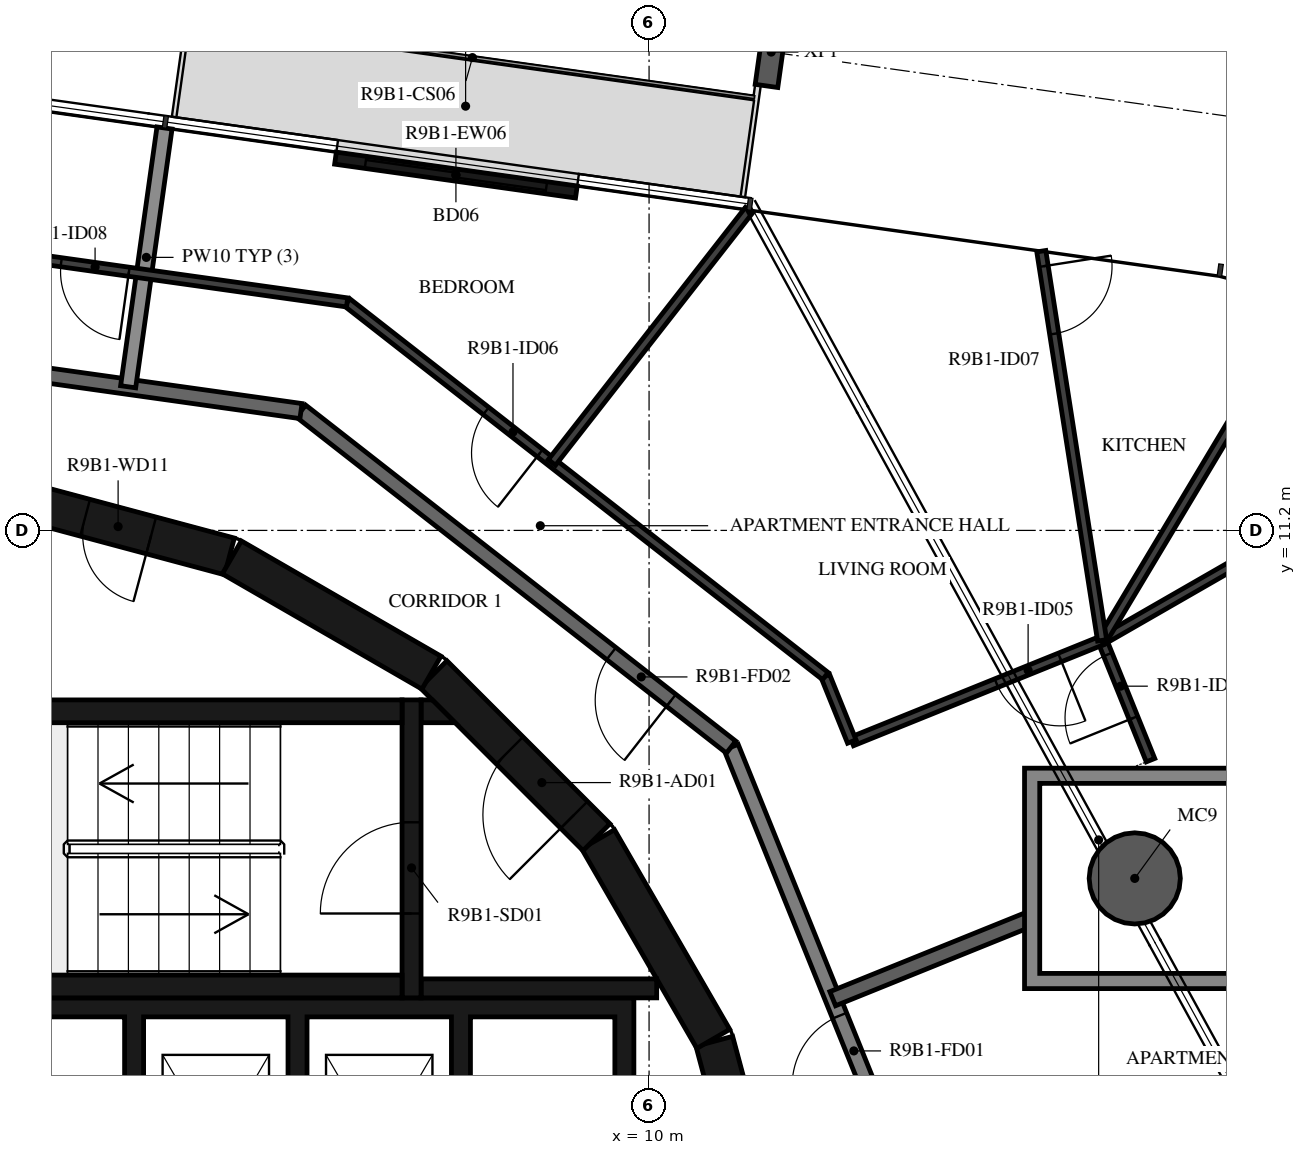
"""IFC4 building model, lengths in metres.
Left out: names, types, materials, properties, quantities, classifications, styles, units other than length and angle.
Written with IfcOpenShell. Run it as: python <this file> out.ifc"""

import sys

from ifc_helpers import new_model, si_unit, direction, frame, frame_2d, origin, origin_2d, place, context, subcontext, project, spatial, polyline, rectangle, hollow_circle, i_section, outline, extrude, element, fill, save


model = new_model("IFC4")
c1 = context("Model", 3, precision=1e-05, world=origin(), true_north=direction((0.0, 1.0)))
c2 = subcontext(c1, "Body", "Model", "MODEL_VIEW")
j1 = project(units=[si_unit("LENGTHUNIT", "METRE"), si_unit("PLANEANGLEUNIT", "RADIAN")], contexts=[c1])
p1 = place(None, origin())
s1 = spatial("IfcSite", under=j1, at=p1, CompositionType="ELEMENT")
p2 = place(p1, origin())
s2 = spatial("IfcBuilding", under=s1, at=p2, CompositionType="ELEMENT")
p3 = place(p2, frame((0.0, 0.0, 350.5)))
s3 = spatial("IfcBuildingStorey", under=s2, at=p3, CompositionType="ELEMENT", Elevation=350.5)
p4 = place(p3, frame((16.39, 6.622, -0.38), z_axis=(0.0, 0.0, 1.0), x_axis=(1.0, 0.0, 0.0)))
e1 = element("IfcColumn", 1, at=p4, inside=s3, PredefinedType="COLUMN", context=c2, shape_type="SweptSolid", body=[
    extrude(hollow_circle(Radius=0.6, WallThickness=0.03, at=origin_2d()), origin(), (0.0, 0.0, 1.0), 3.5),
])
p5 = place(p3, frame((11.607, 17.493, -0.38), z_axis=(0.0, 0.0, 1.0), x_axis=(0.990268081324, -0.139173011432, 0.0)))
e2 = element("IfcColumn", 2, at=p5, inside=s3, PredefinedType="COLUMN", context=c2, shape_type="SweptSolid", body=[
    extrude(i_section(OverallWidth=0.3, OverallDepth=0.9, WebThickness=0.019, FlangeThickness=0.035, FilletRadius=0.03, at=origin_2d()), origin(), (0.0, 0.0, 1.0), 3.5),
])
p6 = place(p3, frame((9.043, 15.652, 0.0), z_axis=(0.0, 0.0, 1.0), x_axis=(-0.990270382149, 0.139156639217, 0.0)))
e3 = element("IfcWall", 3, at=p6, inside=s3, PredefinedType="STANDARD", context=c2, shape_type="SweptSolid", body=[
    extrude(rectangle(XDim=3.2, YDim=0.16, at=frame_2d((1.6, 0.0))), origin(), (0.0, 0.0, 1.0), 3.12),
])
p7 = place(p6, frame((0.4, 0.0, 0.0)))
e4 = element("IfcOpeningElement", 4, at=p7, cuts=e3, PredefinedType="OPENING", context=c2, shape_type="SweptSolid", body=[
    extrude(rectangle(XDim=2.4, YDim=2.4, at=frame_2d((1.2, 1.2))), frame((0.0, 0.09, 0.0), z_axis=(0.0, -1.0, 0.0), x_axis=(1.0, 0.0, 0.0)), (0.0, 0.0, 1.0), 0.18),
])
for number, where, z_axis, x_axis in (
    (5, (11.643, 1.55, 0.0), (0.0, 0.0, 1.0), (-0.259, 0.966, 0.0)),
    (6, (10.845, 4.51, 0.0), (0.0, 0.0, 1.0), (-0.5, 0.866, 0.0)),
):
    element("IfcWall", number, at=place(p3, frame(where, z_axis=z_axis, x_axis=x_axis)), inside=s3, PredefinedType="SHEAR", context=c2, shape_type="SweptSolid", body=[
        extrude(rectangle(XDim=3.033, YDim=0.5, at=frame_2d((1.516, 0.0))), origin(), (0.0, 0.0, 1.0), 3.12),
    ])
p8 = place(p3, frame((9.308, 7.164, 0.0), z_axis=(0.0, 0.0, 1.0), x_axis=(-0.707106781187, 0.707106781187, 0.0)))
e7 = element("IfcWall", 7, at=p8, inside=s3, PredefinedType="SHEAR", context=c2, shape_type="SweptSolid", body=[
    extrude(rectangle(XDim=3.032, YDim=0.5, at=frame_2d((1.516, 0.0))), origin(), (0.0, 0.0, 1.0), 3.12),
])
p9 = place(p8, frame((0.416, 0.0, 0.0)))
e8 = element("IfcOpeningElement", 8, at=p9, cuts=e7, PredefinedType="OPENING", context=c2, shape_type="SweptSolid", body=[
    extrude(rectangle(XDim=1.2, YDim=2.1, at=frame_2d((0.6, 1.05))), frame((0.0, 0.26, 0.0), z_axis=(0.0, -1.0, 0.0), x_axis=(1.0, 0.0, 0.0)), (0.0, 0.0, 1.0), 0.52),
])
p10 = place(p3, frame((7.137, 9.329, 0.0), z_axis=(0.0, 0.0, 1.0), x_axis=(-0.865975092491, 0.500087131594, 0.0)))
e9 = element("IfcWall", 9, at=p10, inside=s3, PredefinedType="SHEAR", context=c2, shape_type="SweptSolid", body=[
    extrude(rectangle(XDim=3.033, YDim=0.5, at=frame_2d((1.516, 0.0))), origin(), (0.0, 0.0, 1.0), 3.12),
])
p11 = place(p3, frame((4.479, 10.858, 0.0), z_axis=(0.0, 0.0, 1.0), x_axis=(-0.965948410781, 0.258734743916, 0.0)))
e10 = element("IfcWall", 10, at=p11, inside=s3, PredefinedType="SHEAR", context=c2, shape_type="SweptSolid", body=[
    extrude(rectangle(XDim=3.033, YDim=0.5, at=frame_2d((1.516, 0.0))), origin(), (0.0, 0.0, 1.0), 3.12),
])
p12 = place(p11, frame((1.066, 0.0, 0.0)))
e11 = element("IfcOpeningElement", 11, at=p12, cuts=e10, PredefinedType="OPENING", context=c2, shape_type="SweptSolid", body=[
    extrude(rectangle(XDim=0.9, YDim=2.1, at=frame_2d((0.45, 1.05))), frame((0.0, 0.26, 0.0), z_axis=(0.0, -1.0, 0.0), x_axis=(1.0, 0.0, 0.0)), (0.0, 0.0, 1.0), 0.52),
])
for number, where, z_axis, x_axis in (
    (12, (0.0, 5.2, 0.0), (0.0, 0.0, 1.0), (1.0, 0.0, 0.0)),
    (13, (0.0, 8.82, 0.0), (0.0, 0.0, 1.0), (1.0, 0.0, 0.0)),
):
    element("IfcWall", number, at=place(p3, frame(where, z_axis=z_axis, x_axis=x_axis)), inside=s3, PredefinedType="SHEAR", context=c2, shape_type="SweptSolid", body=[
        extrude(rectangle(XDim=6.75, YDim=0.3, at=frame_2d((3.375, 0.0))), origin(), (0.0, 0.0, 1.0), 3.12),
    ])
p13 = place(p3, frame((6.875, 5.05, 0.0), z_axis=(0.0, 0.0, 1.0), x_axis=(0.0, 1.0, 0.0)))
e14 = element("IfcWall", 14, at=p13, inside=s3, PredefinedType="SHEAR", context=c2, shape_type="SweptSolid", body=[
    extrude(rectangle(XDim=3.92, YDim=0.25, at=frame_2d((1.96, 0.0))), origin(), (0.0, 0.0, 1.0), 3.12),
])
p14 = place(p13, frame((1.11, 0.0, 0.0)))
e15 = element("IfcOpeningElement", 15, at=p14, cuts=e14, PredefinedType="OPENING", context=c2, shape_type="SweptSolid", body=[
    extrude(rectangle(XDim=1.2, YDim=2.1, at=frame_2d((0.6, 1.05))), frame((0.0, 0.135, 0.0), z_axis=(0.0, -1.0, 0.0), x_axis=(1.0, 0.0, 0.0)), (0.0, 0.0, 1.0), 0.27),
])
p15 = place(p3, frame((7.0, 5.175, 0.0), z_axis=(0.0, 0.0, 1.0), x_axis=(1.0, 0.0, 0.0)))
e16 = element("IfcWall", 16, at=p15, inside=s3, PredefinedType="SHEAR", context=c2, shape_type="SweptSolid", body=[
    extrude(rectangle(XDim=3.1, YDim=0.25, at=frame_2d((1.55, 0.0))), origin(), (0.0, 0.0, 1.0), 3.12),
])
p16 = place(p3, origin())
e17 = element("IfcWall", 17, at=p16, inside=s3, PredefinedType="SHEAR", context=c2, shape_type="SweptSolid", body=[
    extrude(outline(polyline([(7.448, 8.67), (7.0, 8.67), (7.0, 8.97), (7.148, 8.97), (7.448, 8.67)])), origin(), (0.0, 0.0, 1.0), 3.12),
])
p17 = place(p3, origin())
e18 = element("IfcWall", 18, at=p17, inside=s3, PredefinedType="SHEAR", context=c2, shape_type="SweptSolid", body=[
    extrude(outline(polyline([(-9.8, 1.9), (-9.55, 1.9), (-9.55, 4.8), (-1.2, 4.8), (-1.2, 1.9), (-0.95, 1.9), (-0.95, 4.8), (3.1, 4.8), (3.1, 1.9), (3.35, 1.9), (3.35, 4.8), (5.25, 4.8), (5.25, 1.9), (5.5, 1.9), (5.5, 4.8), (7.4, 4.8), (7.4, 1.9), (7.65, 1.9), (7.65, 4.8), (9.55, 4.8), (9.55, 1.9), (9.8, 1.9), (9.8, 4.8), (9.8, 5.05), (-9.8, 5.05), (-9.8, 4.8), (-9.8, 1.9)])), origin(), (0.0, 0.0, 1.0), 3.12),
])
p18 = place(p3, frame((13.769, 1.691, 0.0), z_axis=(0.0, 0.0, 1.0), x_axis=(-0.374618189599, 0.92717916932, 0.0)))
e19 = element("IfcWall", 19, at=p18, inside=s3, PredefinedType="STANDARD", context=c2, shape_type="SweptSolid", body=[
    extrude(rectangle(XDim=7.181, YDim=0.2, at=frame_2d((3.591, 0.0))), origin(), (0.0, 0.0, 1.0), 3.12),
])
p19 = place(p18, frame((2.371, 0.0, 0.0)))
e20 = element("IfcOpeningElement", 20, at=p19, cuts=e19, PredefinedType="OPENING", context=c2, shape_type="SweptSolid", body=[
    extrude(rectangle(XDim=1.0, YDim=2.1, at=frame_2d((0.5, 1.05))), frame((0.0, 0.11, 0.0), z_axis=(0.0, -1.0, 0.0), x_axis=(1.0, 0.0, 0.0)), (0.0, 0.0, 1.0), 0.22),
])
p20 = place(p3, frame((11.079, 8.349, 0.0), z_axis=(0.0, 0.0, 1.0), x_axis=(-0.78800478687, 0.615669112324, 0.0)))
e21 = element("IfcWall", 21, at=p20, inside=s3, PredefinedType="STANDARD", context=c2, shape_type="SweptSolid", body=[
    extrude(rectangle(XDim=7.181, YDim=0.2, at=frame_2d((3.591, 0.0))), origin(), (0.0, 0.0, 1.0), 3.12),
])
p21 = place(p20, frame((1.0, 0.0, 0.0)))
e22 = element("IfcOpeningElement", 22, at=p21, cuts=e21, PredefinedType="OPENING", context=c2, shape_type="SweptSolid", body=[
    extrude(rectangle(XDim=1.0, YDim=2.1, at=frame_2d((0.5, 1.05))), frame((0.0, 0.11, 0.0), z_axis=(0.0, -1.0, 0.0), x_axis=(1.0, 0.0, 0.0)), (0.0, 0.0, 1.0), 0.22),
])
p22 = place(p3, frame((5.42, 12.77, 0.0), z_axis=(0.0, 0.0, 1.0), x_axis=(-0.990270565508, 0.139155334385, 0.0)))
e23 = element("IfcWall", 23, at=p22, inside=s3, PredefinedType="STANDARD", context=c2, shape_type="SweptSolid", body=[
    extrude(rectangle(XDim=7.181, YDim=0.2, at=frame_2d((3.59, 0.0))), origin(), (0.0, 0.0, 1.0), 3.12),
])
p23 = place(p3, frame((14.989, 6.079, 0.0), z_axis=(0.0, 0.0, 1.0), x_axis=(-0.927203056473, -0.374559063523, 0.0)))
e24 = element("IfcWall", 24, at=p23, inside=s3, PredefinedType="STANDARD", context=c2, shape_type="SweptSolid", body=[
    extrude(rectangle(XDim=2.775, YDim=0.2, at=frame_2d((1.387, 0.0))), origin(), (0.0, 0.0, 1.0), 3.12),
])
p24 = place(p3, frame((3.625, 16.494, 0.0), z_axis=(0.0, 0.0, 1.0), x_axis=(-0.139174320859, -0.990267897295, 0.0)))
e25 = element("IfcWall", 25, at=p24, inside=s3, PredefinedType="STANDARD", context=c2, shape_type="SweptSolid", body=[
    extrude(rectangle(XDim=3.438, YDim=0.2, at=frame_2d((1.719, 0.0))), origin(), (0.0, 0.0, 1.0), 2.73),
])
p25 = place(p3, frame((16.597, 8.177, 0.0), z_axis=(0.0, 0.0, 1.0), x_axis=(-0.374631609957, 0.927173746835, 0.0)))
e26 = element("IfcWall", 26, at=p25, inside=s3, PredefinedType="PARTITIONING", context=c2, shape_type="SweptSolid", body=[
    extrude(rectangle(XDim=1.7, YDim=0.12, at=frame_2d((0.85, 0.0))), origin(), (0.0, 0.0, 1.0), 3.12),
])
p26 = place(p25, frame((0.6, 0.0, 0.0)))
e27 = element("IfcOpeningElement", 27, at=p26, cuts=e26, PredefinedType="OPENING", context=c2, shape_type="SweptSolid", body=[
    extrude(rectangle(XDim=0.9, YDim=2.1, at=frame_2d((0.45, 1.05))), frame((0.0, 0.07, 0.0), z_axis=(0.0, -1.0, 0.0), x_axis=(1.0, 0.0, 0.0)), (0.0, 0.0, 1.0), 0.14),
])
p27 = place(p3, frame((15.96, 9.753, 0.0), z_axis=(0.0, 0.0, 1.0), x_axis=(-0.927148174805, -0.37469489182, 0.0)))
e28 = element("IfcWall", 28, at=p27, inside=s3, PredefinedType="PARTITIONING", context=c2, shape_type="SweptSolid", body=[
    extrude(rectangle(XDim=3.552, YDim=0.12, at=frame_2d((1.776, 0.0))), origin(), (0.0, 0.0, 1.0), 3.12),
])
p28 = place(p27, frame((0.6, 0.0, 0.0)))
e29 = element("IfcOpeningElement", 29, at=p28, cuts=e28, PredefinedType="OPENING", context=c2, shape_type="SweptSolid", body=[
    extrude(rectangle(XDim=0.9, YDim=2.1, at=frame_2d((0.45, 1.05))), frame((0.0, 0.07, 0.0), z_axis=(0.0, -1.0, 0.0), x_axis=(1.0, 0.0, 0.0)), (0.0, 0.0, 1.0), 0.14),
])
p29 = place(p3, frame((12.667, 8.423, 0.0), z_axis=(0.0, 0.0, 1.0), x_axis=(-0.374697807675, 0.927146996395, 0.0)))
e30 = element("IfcWall", 30, at=p29, inside=s3, PredefinedType="PARTITIONING", context=c2, shape_type="SweptSolid", body=[
    extrude(rectangle(XDim=0.928, YDim=0.12, at=frame_2d((0.464, 0.0))), origin(), (0.0, 0.0, 1.0), 3.12),
])
p30 = place(p3, frame((12.319, 9.283, 0.0), z_axis=(0.0, 0.0, 1.0), x_axis=(-0.788000268464, 0.61567489546, 0.0)))
e31 = element("IfcWall", 31, at=p30, inside=s3, PredefinedType="PARTITIONING", context=c2, shape_type="SweptSolid", body=[
    extrude(rectangle(XDim=7.985, YDim=0.12, at=frame_2d((3.992, 0.0))), origin(), (0.0, 0.0, 1.0), 3.12),
])
p31 = place(p30, frame((4.765, 0.0, 0.0)))
e32 = element("IfcOpeningElement", 32, at=p31, cuts=e31, PredefinedType="OPENING", context=c2, shape_type="SweptSolid", body=[
    extrude(rectangle(XDim=0.9, YDim=2.1, at=frame_2d((0.45, 1.05))), frame((0.0, 0.07, 0.0), z_axis=(0.0, -1.0, 0.0), x_axis=(1.0, 0.0, 0.0)), (0.0, 0.0, 1.0), 0.14),
])
p32 = place(p3, frame((6.027, 14.199, 0.0), z_axis=(0.0, 0.0, 1.0), x_axis=(-0.990271593532, 0.139148018469, 0.0)))
e33 = element("IfcWall", 33, at=p32, inside=s3, PredefinedType="PARTITIONING", context=c2, shape_type="SweptSolid", body=[
    extrude(rectangle(XDim=7.985, YDim=0.12, at=frame_2d((3.992, 0.0))), origin(), (0.0, 0.0, 1.0), 3.12),
])
p33 = place(p32, frame((2.898, 0.0, 0.0)))
e34 = element("IfcOpeningElement", 34, at=p33, cuts=e33, PredefinedType="OPENING", context=c2, shape_type="SweptSolid", body=[
    extrude(rectangle(XDim=0.9, YDim=2.1, at=frame_2d((0.45, 1.05))), frame((0.0, 0.07, 0.0), z_axis=(0.0, -1.0, 0.0), x_axis=(1.0, 0.0, 0.0)), (0.0, 0.0, 1.0), 0.14),
])
p34 = place(p3, frame((21.343, 12.847, 0.0), z_axis=(0.0, 0.0, 1.0), x_axis=(-0.866974691568, -0.498352168832, 0.0)))
e35 = element("IfcWall", 35, at=p34, inside=s3, PredefinedType="PARTITIONING", context=c2, shape_type="SweptSolid", body=[
    extrude(rectangle(XDim=6.208, YDim=0.12, at=frame_2d((3.104, 0.0))), origin(), (0.0, 0.0, 1.0), 3.12),
])
p35 = place(p3, frame((18.649, 14.244, 0.0), z_axis=(0.0, 0.0, 1.0), x_axis=(-0.513782200586, -0.85792065505, 0.0)))
e36 = element("IfcWall", 36, at=p35, inside=s3, PredefinedType="PARTITIONING", context=c2, shape_type="SweptSolid", body=[
    extrude(rectangle(XDim=5.234, YDim=0.12, at=frame_2d((2.617, 0.0))), origin(), (0.0, 0.0, 1.0), 3.12),
])
p36 = place(p35, frame((0.2, 0.0, 0.0)))
e37 = element("IfcOpeningElement", 37, at=p36, cuts=e36, PredefinedType="OPENING", context=c2, shape_type="SweptSolid", body=[
    extrude(rectangle(XDim=0.8, YDim=2.1, at=frame_2d((0.4, 1.05))), frame((0.0, 0.07, 0.0), z_axis=(0.0, -1.0, 0.0), x_axis=(1.0, 0.0, 0.0)), (0.0, 0.0, 1.0), 0.14),
])
p37 = place(p3, frame((15.16, 14.873, 0.0), z_axis=(0.0, 0.0, 1.0), x_axis=(0.154389815045, -0.988010012606, 0.0)))
e38 = element("IfcWall", 38, at=p37, inside=s3, PredefinedType="PARTITIONING", context=c2, shape_type="SweptSolid", body=[
    extrude(rectangle(XDim=5.182, YDim=0.12, at=frame_2d((2.591, 0.0))), origin(), (0.0, 0.0, 1.0), 3.12),
])
p38 = place(p37, frame((0.2, 0.0, 0.0)))
e39 = element("IfcOpeningElement", 39, at=p38, cuts=e38, PredefinedType="OPENING", context=c2, shape_type="SweptSolid", body=[
    extrude(rectangle(XDim=0.9, YDim=2.1, at=frame_2d((0.45, 1.05))), frame((0.0, 0.07, 0.0), z_axis=(0.0, -1.0, 0.0), x_axis=(1.0, 0.0, 0.0)), (0.0, 0.0, 1.0), 0.14),
])
p39 = place(p3, frame((11.315, 15.414, 0.0), z_axis=(0.0, 0.0, 1.0), x_axis=(-0.615656413137, -0.788014708596, 0.0)))
e40 = element("IfcWall", 40, at=p39, inside=s3, PredefinedType="PARTITIONING", context=c2, shape_type="SweptSolid", body=[
    extrude(rectangle(XDim=4.213, YDim=0.12, at=frame_2d((2.106, 0.0))), origin(), (0.0, 0.0, 1.0), 3.12),
])
p40 = place(p3, origin())
e41 = element("IfcWall", 41, at=p40, inside=s3, PredefinedType="STANDARD", context=c2, shape_type="SweptSolid", body=[
    extrude(outline(polyline([(17.84, 8.072), (17.84, 5.172), (14.94, 5.172), (14.94, 8.072), (17.84, 8.072)]), holes=[polyline([(15.14, 5.372), (17.64, 5.372), (17.64, 7.872), (15.14, 7.872), (15.14, 5.372)])]), origin(), (0.0, 0.0, 1.0), 3.12),
])
p41 = place(p7, origin())
e42 = element("IfcDoor", 42, at=p41, inside=s3, OperationType="DOUBLE_DOOR_SLIDING", PredefinedType="DOOR", context=c2, shape_type="SweptSolid", body=[
    extrude(rectangle(XDim=2.4, YDim=2.4, at=frame_2d((1.2, 1.2))), frame((0.0, 0.025, 0.0), z_axis=(0.0, -1.0, 0.0), x_axis=(1.0, 0.0, 0.0)), (0.0, 0.0, 1.0), 0.05),
])
fill(e4, e42)
p42 = place(p14, origin())
e43 = element("IfcDoor", 43, at=p42, inside=s3, OperationType="SINGLE_SWING_LEFT", PredefinedType="DOOR", context=c2, shape_type="SweptSolid", body=[
    extrude(rectangle(XDim=1.2, YDim=2.1, at=frame_2d((0.6, 1.05))), frame((0.0, 0.025, 0.0), z_axis=(0.0, -1.0, 0.0), x_axis=(1.0, 0.0, 0.0)), (0.0, 0.0, 1.0), 0.05),
])
fill(e15, e43)
p43 = place(p9, origin())
e44 = element("IfcDoor", 44, at=p43, inside=s3, OperationType="SINGLE_SWING_RIGHT", PredefinedType="DOOR", context=c2, shape_type="SweptSolid", body=[
    extrude(rectangle(XDim=1.2, YDim=2.1, at=frame_2d((0.6, 1.05))), frame((0.0, 0.025, 0.0), z_axis=(0.0, -1.0, 0.0), x_axis=(1.0, 0.0, 0.0)), (0.0, 0.0, 1.0), 0.05),
])
fill(e8, e44)
p44 = place(p12, origin())
e45 = element("IfcDoor", 45, at=p44, inside=s3, OperationType="SINGLE_SWING_LEFT", PredefinedType="DOOR", context=c2, shape_type="SweptSolid", body=[
    extrude(rectangle(XDim=0.9, YDim=2.1, at=frame_2d((0.45, 1.05))), frame((0.0, 0.025, 0.0), z_axis=(0.0, -1.0, 0.0), x_axis=(1.0, 0.0, 0.0)), (0.0, 0.0, 1.0), 0.05),
])
fill(e11, e45)
p45 = place(p19, origin())
e46 = element("IfcDoor", 46, at=p45, inside=s3, OperationType="SINGLE_SWING_LEFT", PredefinedType="DOOR", context=c2, shape_type="SweptSolid", body=[
    extrude(rectangle(XDim=1.0, YDim=2.1, at=frame_2d((0.5, 1.05))), frame((0.0, 0.025, 0.0), z_axis=(0.0, -1.0, 0.0), x_axis=(1.0, 0.0, 0.0)), (0.0, 0.0, 1.0), 0.05),
])
fill(e20, e46)
p46 = place(p21, origin())
e47 = element("IfcDoor", 47, at=p46, inside=s3, OperationType="SINGLE_SWING_LEFT", PredefinedType="DOOR", context=c2, shape_type="SweptSolid", body=[
    extrude(rectangle(XDim=1.0, YDim=2.1, at=frame_2d((0.5, 1.05))), frame((0.0, 0.025, 0.0), z_axis=(0.0, -1.0, 0.0), x_axis=(1.0, 0.0, 0.0)), (0.0, 0.0, 1.0), 0.05),
])
fill(e22, e47)
p47 = place(p26, origin())
e48 = element("IfcDoor", 48, at=p47, inside=s3, OperationType="SINGLE_SWING_LEFT", PredefinedType="DOOR", context=c2, shape_type="SweptSolid", body=[
    extrude(rectangle(XDim=0.9, YDim=2.1, at=frame_2d((0.45, 1.05))), frame((0.0, 0.025, 0.0), z_axis=(0.0, -1.0, 0.0), x_axis=(1.0, 0.0, 0.0)), (0.0, 0.0, 1.0), 0.05),
])
fill(e27, e48)
p48 = place(p28, origin())
e49 = element("IfcDoor", 49, at=p48, inside=s3, OperationType="SINGLE_SWING_RIGHT", PredefinedType="DOOR", context=c2, shape_type="SweptSolid", body=[
    extrude(rectangle(XDim=0.9, YDim=2.1, at=frame_2d((0.45, 1.05))), frame((0.0, 0.025, 0.0), z_axis=(0.0, -1.0, 0.0), x_axis=(1.0, 0.0, 0.0)), (0.0, 0.0, 1.0), 0.05),
])
fill(e29, e49)
p49 = place(p31, origin())
e50 = element("IfcDoor", 50, at=p49, inside=s3, OperationType="SINGLE_SWING_LEFT", PredefinedType="DOOR", context=c2, shape_type="SweptSolid", body=[
    extrude(rectangle(XDim=0.9, YDim=2.1, at=frame_2d((0.45, 1.05))), frame((0.0, 0.025, 0.0), z_axis=(0.0, -1.0, 0.0), x_axis=(1.0, 0.0, 0.0)), (0.0, 0.0, 1.0), 0.05),
])
fill(e32, e50)
p50 = place(p38, origin())
e51 = element("IfcDoor", 51, at=p50, inside=s3, OperationType="SINGLE_SWING_LEFT", PredefinedType="DOOR", context=c2, shape_type="SweptSolid", body=[
    extrude(rectangle(XDim=0.9, YDim=2.1, at=frame_2d((0.45, 1.05))), frame((0.0, 0.025, 0.0), z_axis=(0.0, -1.0, 0.0), x_axis=(1.0, 0.0, 0.0)), (0.0, 0.0, 1.0), 0.05),
])
fill(e39, e51)
p51 = place(p33, origin())
e52 = element("IfcDoor", 52, at=p51, inside=s3, OperationType="SINGLE_SWING_LEFT", PredefinedType="DOOR", context=c2, shape_type="SweptSolid", body=[
    extrude(rectangle(XDim=0.9, YDim=2.1, at=frame_2d((0.45, 1.05))), frame((0.0, 0.025, 0.0), z_axis=(0.0, -1.0, 0.0), x_axis=(1.0, 0.0, 0.0)), (0.0, 0.0, 1.0), 0.05),
])
fill(e34, e52)
save(model, sys.argv[1])
